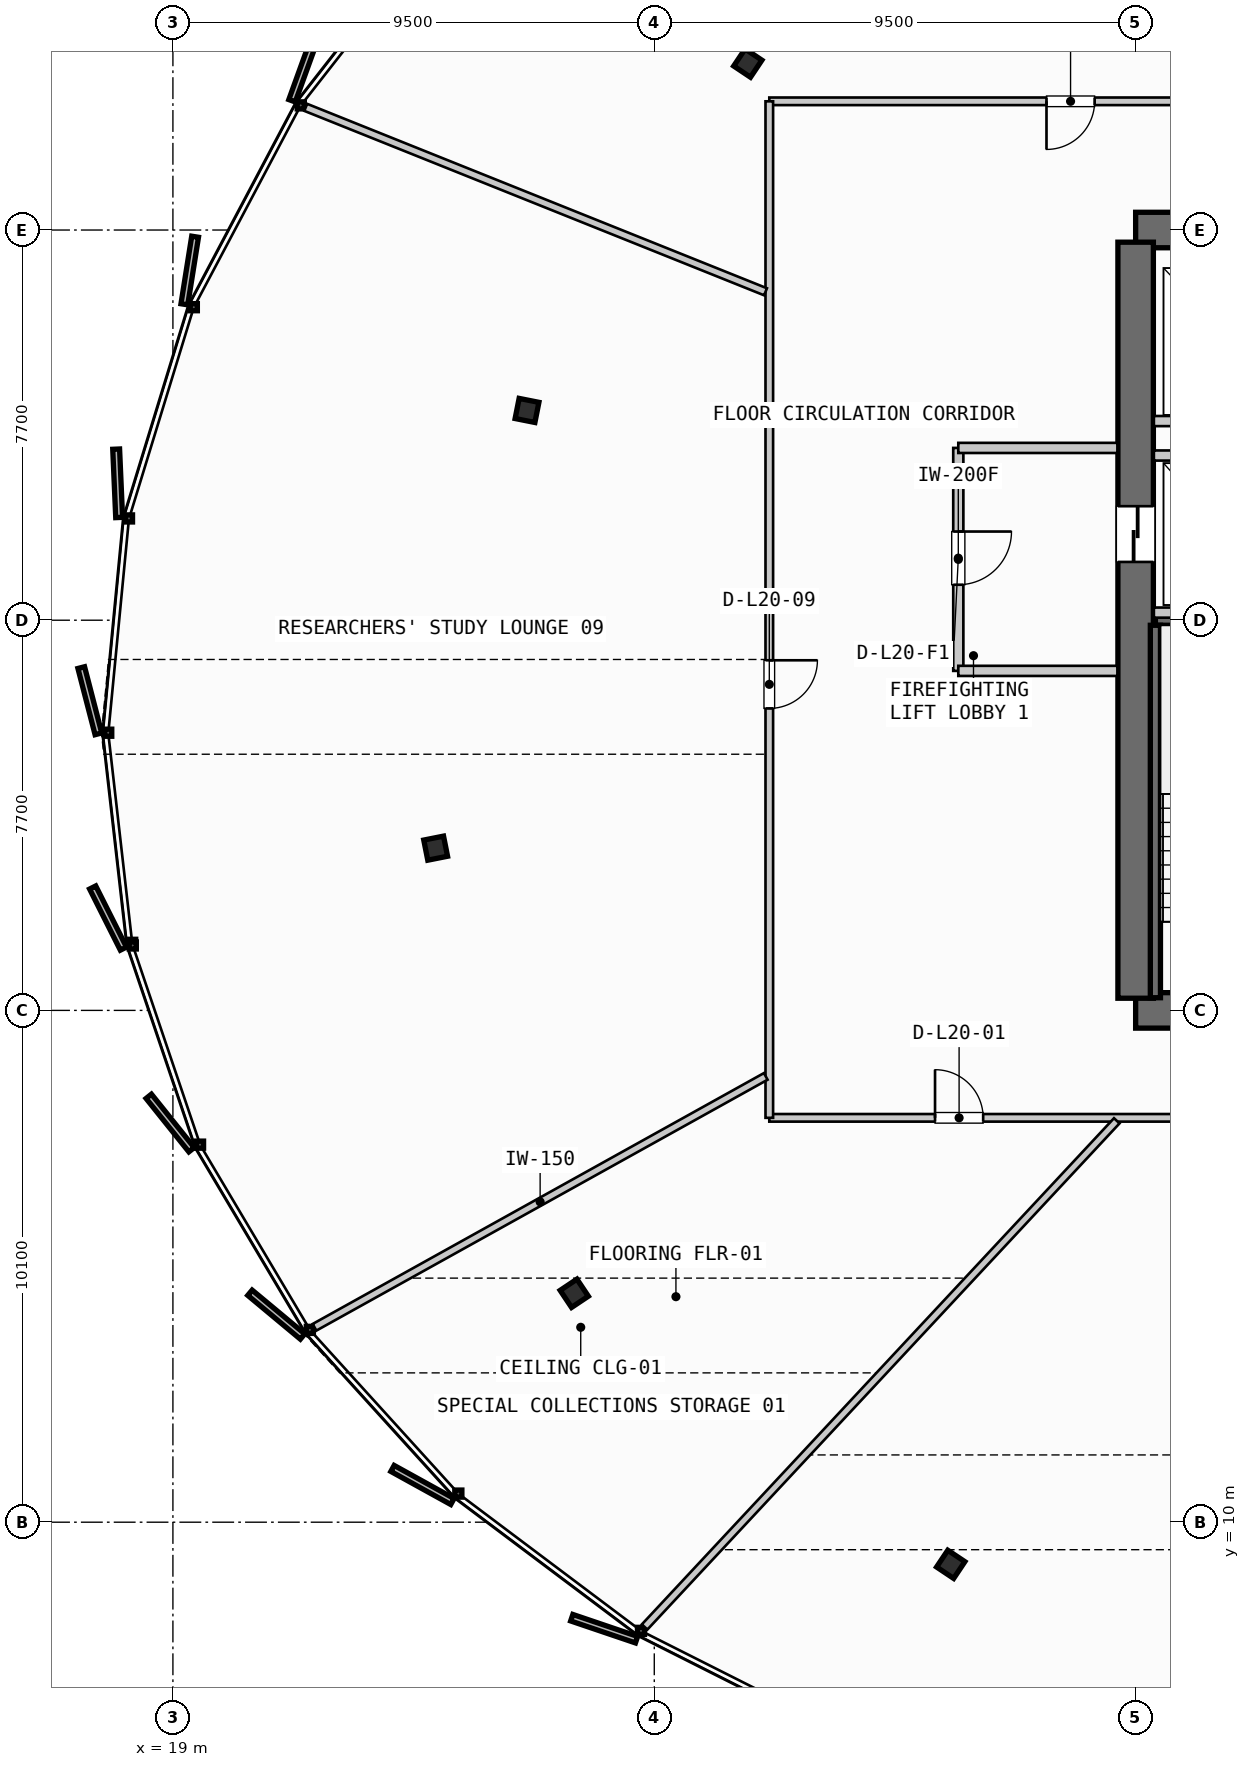
"""IFC4 building model, lengths in metres.
Left out: names, types, materials, properties, quantities, classifications, styles, units other than length and angle.
Written with IfcOpenShell. Run it as: python <this file> out.ifc"""

import sys

from ifc_helpers import new_model, si_unit, direction, frame, frame_2d, origin, origin_2d, place, context, subcontext, project, spatial, rectangle, i_section, extrude, source, transform, mapped, element, fill, save


model = new_model("IFC4")
c1 = context("Model", 3, precision=1e-05, world=origin(), true_north=direction((0.0, 1.0)))
c2 = subcontext(c1, "Body", "Model", "MODEL_VIEW")
j1 = project(units=[si_unit("LENGTHUNIT", "METRE"), si_unit("PLANEANGLEUNIT", "RADIAN")], contexts=[c1])
p1 = place(None, origin())
s1 = spatial("IfcSite", under=j1, at=p1, CompositionType="ELEMENT")
p2 = place(p1, origin())
s2 = spatial("IfcBuilding", under=s1, at=p2, CompositionType="ELEMENT")
p3 = place(p2, frame((0.0, 0.0, 85.6)))
s3 = spatial("IfcBuildingStorey", under=s2, at=p3, CompositionType="ELEMENT", Elevation=85.6)
p4 = place(p3, frame((38.0, 20.1, 0.0), z_axis=(0.0, 0.0, 1.0), x_axis=(1.0, 0.0, 0.0)))
e1 = element("IfcWall", 1, at=p4, inside=s3, PredefinedType="SHEAR", context=c2, shape_type="SweptSolid", body=[
    extrude(rectangle(XDim=17.6, YDim=0.7, at=frame_2d((8.8, 0.0))), origin(), (0.0, 0.0, 1.0), 3.35),
])
p5 = place(p4, frame((1.4, 0.0, 0.0)))
e2 = element("IfcOpeningElement", 2, at=p5, cuts=e1, PredefinedType="OPENING", context=c2, shape_type="SweptSolid", body=[
    extrude(rectangle(XDim=1.05, YDim=2.15, at=frame_2d((0.525, 1.075))), frame((0.0, 0.36, 0.0), z_axis=(0.0, -1.0, 0.0), x_axis=(1.0, 0.0, 0.0)), (0.0, 0.0, 1.0), 0.72),
])
p6 = place(p4, frame((15.15, 0.0, 0.0)))
e3 = element("IfcOpeningElement", 3, at=p6, cuts=e1, PredefinedType="OPENING", context=c2, shape_type="SweptSolid", body=[
    extrude(rectangle(XDim=1.05, YDim=2.15, at=frame_2d((0.525, 1.075))), frame((0.0, 0.36, 0.0), z_axis=(0.0, -1.0, 0.0), x_axis=(1.0, 0.0, 0.0)), (0.0, 0.0, 1.0), 0.72),
])
p7 = place(p3, frame((55.6, 35.5, 0.0), z_axis=(0.0, 0.0, 1.0), x_axis=(-1.0, 0.0, 0.0)))
e4 = element("IfcWall", 4, at=p7, inside=s3, PredefinedType="SHEAR", context=c2, shape_type="SweptSolid", body=[
    extrude(rectangle(XDim=17.6, YDim=0.7, at=frame_2d((8.8, 0.0))), origin(), (0.0, 0.0, 1.0), 3.35),
])
p8 = place(p7, frame((8.05, 0.0, 0.0)))
e5 = element("IfcOpeningElement", 5, at=p8, cuts=e4, PredefinedType="OPENING", context=c2, shape_type="SweptSolid", body=[
    extrude(rectangle(XDim=1.5, YDim=2.2, at=frame_2d((0.75, 1.1))), frame((0.0, 0.36, 0.0), z_axis=(0.0, -1.0, 0.0), x_axis=(1.0, 0.0, 0.0)), (0.0, 0.0, 1.0), 0.72),
])
p9 = place(p7, frame((14.95, 0.0, 0.0)))
e6 = element("IfcOpeningElement", 6, at=p9, cuts=e4, PredefinedType="OPENING", context=c2, shape_type="SweptSolid", body=[
    extrude(rectangle(XDim=1.4, YDim=2.3, at=frame_2d((0.7, 1.15))), frame((0.0, 0.36, 0.0), z_axis=(0.0, -1.0, 0.0), x_axis=(1.0, 0.0, 0.0)), (0.0, 0.0, 1.0), 0.72),
])
p10 = place(p7, frame((12.9, 0.0, 0.0)))
e7 = element("IfcOpeningElement", 7, at=p10, cuts=e4, PredefinedType="OPENING", context=c2, shape_type="SweptSolid", body=[
    extrude(rectangle(XDim=0.9, YDim=2.15, at=frame_2d((0.45, 1.075))), frame((0.0, 0.36, 0.0), z_axis=(0.0, -1.0, 0.0), x_axis=(1.0, 0.0, 0.0)), (0.0, 0.0, 1.0), 0.72),
])
p11 = place(p7, frame((10.6, 0.0, 0.0)))
e8 = element("IfcOpeningElement", 8, at=p11, cuts=e4, PredefinedType="OPENING", context=c2, shape_type="SweptSolid", body=[
    extrude(rectangle(XDim=0.95, YDim=2.15, at=frame_2d((0.475, 1.075))), frame((0.0, 0.36, 0.0), z_axis=(0.0, -1.0, 0.0), x_axis=(1.0, 0.0, 0.0)), (0.0, 0.0, 1.0), 0.72),
])
p12 = place(p3, frame((38.0, 35.26, 0.0), z_axis=(0.0, 0.0, 1.0), x_axis=(0.0, -1.0, 0.0)))
e9 = element("IfcWall", 9, at=p12, inside=s3, PredefinedType="SHEAR", context=c2, shape_type="SweptSolid", body=[
    extrude(rectangle(XDim=14.92, YDim=0.7, at=frame_2d((7.46, 0.0))), origin(), (0.0, 0.0, 1.0), 3.35),
])
p13 = place(p12, frame((5.21, 0.0, 0.0)))
e10 = element("IfcOpeningElement", 10, at=p13, cuts=e9, PredefinedType="OPENING", context=c2, shape_type="SweptSolid", body=[
    extrude(rectangle(XDim=1.1, YDim=2.2, at=frame_2d((0.55, 1.1))), frame((0.0, 0.36, 0.0), z_axis=(0.0, -1.0, 0.0), x_axis=(1.0, 0.0, 0.0)), (0.0, 0.0, 1.0), 0.72),
])
m1 = source(origin(), c2, "Body", "SweptSolid", [
    extrude(i_section(OverallWidth=0.405, OverallDepth=0.398, WebThickness=0.035, FlangeThickness=0.056, FilletRadius=0.015, at=origin_2d()), origin(), (0.0, 0.0, 1.0), 3.35),
])
for number, where, z_axis, x_axis in (
    (11, (30.346, 38.794, 0.0), (0.0, 0.0, 1.0), (-0.831, 0.556, 0.0)),
    (12, (25.989, 31.94, 0.0), (0.0, 0.0, 1.0), (-0.981, 0.195, 0.0)),
    (13, (24.185, 23.302, 0.0), (0.0, 0.0, 1.0), (-0.981, -0.195, 0.0)),
    (14, (26.921, 14.517, 0.0), (0.0, 0.0, 1.0), (-0.831, -0.556, 0.0)),
    (15, (34.351, 9.168, 0.0), (0.0, 0.0, 1.0), (-0.556, -0.831, 0.0)),
):
    element("IfcColumn", number, at=place(p3, frame(where, z_axis=z_axis, x_axis=x_axis)), inside=s3, PredefinedType="COLUMN", context=c2, shape_type="MappedRepresentation", body=[
        mapped(m1, transform((0.0, 0.0, 0.0), scale=1.0)),
    ])
p14 = place(p3, frame((38.39, 27.8, 0.0), z_axis=(0.0, 0.0, 1.0), x_axis=(1.0, 0.0, 0.0)))
e16 = element("IfcWall", 16, at=p14, inside=s3, PredefinedType="SHEAR", context=c2, shape_type="SweptSolid", body=[
    extrude(rectangle(XDim=3.06, YDim=0.2, at=frame_2d((1.53, 0.0))), origin(), (0.0, 0.0, 1.0), 3.35),
])
p15 = place(p3, frame((38.39, 20.35, 0.0), z_axis=(0.0, 0.0, 1.0), x_axis=(0.0, 1.0, 0.0)))
e17 = element("IfcWall", 17, at=p15, inside=s3, PredefinedType="SHEAR", context=c2, shape_type="SweptSolid", body=[
    extrude(rectangle(XDim=7.35, YDim=0.2, at=frame_2d((3.675, 0.0))), origin(), (0.0, 0.0, 1.0), 3.35),
])
for number, where, z_axis, x_axis in (
    (18, (38.36, 27.95, 0.0), (0.0, 0.0, 1.0), (1.0, 0.0, 0.0)),
    (19, (38.36, 31.05, 0.0), (0.0, 0.0, 1.0), (1.0, 0.0, 0.0)),
):
    element("IfcWall", number, at=place(p3, frame(where, z_axis=z_axis, x_axis=x_axis)), inside=s3, PredefinedType="PARTITIONING", context=c2, shape_type="SweptSolid", body=[
        extrude(rectangle(XDim=2.79, YDim=0.2, at=frame_2d((1.395, 0.0))), origin(), (0.0, 0.0, 1.0), 2.28),
    ])
p16 = place(p3, frame((34.5, 31.2, 0.0), z_axis=(0.0, 0.0, 1.0), x_axis=(0.0, -1.0, 0.0)))
e20 = element("IfcWall", 20, at=p16, inside=s3, PredefinedType="PARTITIONING", context=c2, shape_type="SweptSolid", body=[
    extrude(rectangle(XDim=4.4, YDim=0.2, at=frame_2d((2.2, 0.0))), origin(), (0.0, 0.0, 1.0), 2.28),
])
p17 = place(p16, frame((1.65, 0.0, 0.0)))
e21 = element("IfcOpeningElement", 21, at=p17, cuts=e20, PredefinedType="OPENING", context=c2, shape_type="SweptSolid", body=[
    extrude(rectangle(XDim=1.05, YDim=2.15, at=frame_2d((0.525, 1.075))), frame((0.0, 0.11, 0.0), z_axis=(0.0, -1.0, 0.0), x_axis=(1.0, 0.0, 0.0)), (0.0, 0.0, 1.0), 0.22),
])
for number, where, z_axis, x_axis in (
    (22, (34.5, 26.8, 0.0), (0.0, 0.0, 1.0), (1.0, 0.0, 0.0)),
    (23, (34.5, 31.2, 0.0), (0.0, 0.0, 1.0), (1.0, 0.0, 0.0)),
):
    element("IfcWall", number, at=place(p3, frame(where, z_axis=z_axis, x_axis=x_axis)), inside=s3, PredefinedType="PARTITIONING", context=c2, shape_type="SweptSolid", body=[
        extrude(rectangle(XDim=3.14, YDim=0.2, at=frame_2d((1.57, 0.0))), origin(), (0.0, 0.0, 1.0), 2.28),
    ])
p18 = place(p3, frame((38.36, 31.73, 0.0), z_axis=(0.0, 0.0, 1.0), x_axis=(1.0, 0.0, 0.0)))
e24 = element("IfcWall", 24, at=p18, inside=s3, PredefinedType="PARTITIONING", context=c2, shape_type="SweptSolid", body=[
    extrude(rectangle(XDim=7.44, YDim=0.2, at=frame_2d((3.72, 0.0))), origin(), (0.0, 0.0, 1.0), 2.28),
])
p19 = place(p3, frame((30.77, 17.98, 0.0), z_axis=(0.0, 0.0, 1.0), x_axis=(1.0, 0.0, 0.0)))
e25 = element("IfcWall", 25, at=p19, inside=s3, PredefinedType="PARTITIONING", context=c2, shape_type="SweptSolid", body=[
    extrude(rectangle(XDim=31.54, YDim=0.15, at=frame_2d((15.77, 0.0))), origin(), (0.0, 0.0, 1.0), 2.28),
])
p20 = place(p19, frame((3.271, 0.0, 0.0)))
e26 = element("IfcOpeningElement", 26, at=p20, cuts=e25, PredefinedType="OPENING", context=c2, shape_type="SweptSolid", body=[
    extrude(rectangle(XDim=0.95, YDim=2.15, at=frame_2d((0.475, 1.075))), frame((0.0, 0.085, 0.0), z_axis=(0.0, -1.0, 0.0), x_axis=(1.0, 0.0, 0.0)), (0.0, 0.0, 1.0), 0.17),
])
p21 = place(p19, frame((13.234, 0.0, 0.0)))
e27 = element("IfcOpeningElement", 27, at=p21, cuts=e25, PredefinedType="OPENING", context=c2, shape_type="SweptSolid", body=[
    extrude(rectangle(XDim=0.95, YDim=2.15, at=frame_2d((0.475, 1.075))), frame((0.0, 0.085, 0.0), z_axis=(0.0, -1.0, 0.0), x_axis=(1.0, 0.0, 0.0)), (0.0, 0.0, 1.0), 0.17),
])
p22 = place(p19, frame((25.295, 0.0, 0.0)))
e28 = element("IfcOpeningElement", 28, at=p22, cuts=e25, PredefinedType="OPENING", context=c2, shape_type="SweptSolid", body=[
    extrude(rectangle(XDim=0.95, YDim=2.15, at=frame_2d((0.475, 1.075))), frame((0.0, 0.085, 0.0), z_axis=(0.0, -1.0, 0.0), x_axis=(1.0, 0.0, 0.0)), (0.0, 0.0, 1.0), 0.17),
])
p23 = place(p3, frame((62.31, 38.04, 0.0), z_axis=(0.0, 0.0, 1.0), x_axis=(-1.0, 0.0, 0.0)))
e29 = element("IfcWall", 29, at=p23, inside=s3, PredefinedType="PARTITIONING", context=c2, shape_type="SweptSolid", body=[
    extrude(rectangle(XDim=31.54, YDim=0.15, at=frame_2d((15.77, 0.0))), origin(), (0.0, 0.0, 1.0), 2.28),
])
p24 = place(p23, frame((2.419, 0.0, 0.0)))
e30 = element("IfcOpeningElement", 30, at=p24, cuts=e29, PredefinedType="OPENING", context=c2, shape_type="SweptSolid", body=[
    extrude(rectangle(XDim=0.95, YDim=2.15, at=frame_2d((0.475, 1.075))), frame((0.0, 0.085, 0.0), z_axis=(0.0, -1.0, 0.0), x_axis=(1.0, 0.0, 0.0)), (0.0, 0.0, 1.0), 0.17),
])
p25 = place(p23, frame((12.199, 0.0, 0.0)))
e31 = element("IfcOpeningElement", 31, at=p25, cuts=e29, PredefinedType="OPENING", context=c2, shape_type="SweptSolid", body=[
    extrude(rectangle(XDim=0.95, YDim=2.15, at=frame_2d((0.475, 1.075))), frame((0.0, 0.085, 0.0), z_axis=(0.0, -1.0, 0.0), x_axis=(1.0, 0.0, 0.0)), (0.0, 0.0, 1.0), 0.17),
])
p26 = place(p23, frame((25.119, 0.0, 0.0)))
e32 = element("IfcOpeningElement", 32, at=p26, cuts=e29, PredefinedType="OPENING", context=c2, shape_type="SweptSolid", body=[
    extrude(rectangle(XDim=0.95, YDim=2.15, at=frame_2d((0.475, 1.075))), frame((0.0, 0.085, 0.0), z_axis=(0.0, -1.0, 0.0), x_axis=(1.0, 0.0, 0.0)), (0.0, 0.0, 1.0), 0.17),
])
p27 = place(p3, frame((30.77, 38.04, 0.0), z_axis=(0.0, 0.0, 1.0), x_axis=(0.0, -1.0, 0.0)))
e33 = element("IfcWall", 33, at=p27, inside=s3, PredefinedType="PARTITIONING", context=c2, shape_type="SweptSolid", body=[
    extrude(rectangle(XDim=20.06, YDim=0.15, at=frame_2d((10.03, 0.0))), origin(), (0.0, 0.0, 1.0), 2.28),
])
p28 = place(p27, frame((11.031, 0.0, 0.0)))
e34 = element("IfcOpeningElement", 34, at=p28, cuts=e33, PredefinedType="OPENING", context=c2, shape_type="SweptSolid", body=[
    extrude(rectangle(XDim=0.95, YDim=2.15, at=frame_2d((0.475, 1.075))), frame((0.0, 0.085, 0.0), z_axis=(0.0, -1.0, 0.0), x_axis=(1.0, 0.0, 0.0)), (0.0, 0.0, 1.0), 0.17),
])
p29 = place(p3, frame((30.7, 18.797, 0.0), z_axis=(0.0, 0.0, 1.0), x_axis=(-0.874030662719, -0.485870765355, 0.0)))
e35 = element("IfcWall", 35, at=p29, inside=s3, PredefinedType="PARTITIONING", context=c2, shape_type="SweptSolid", body=[
    extrude(rectangle(XDim=10.189, YDim=0.15, at=frame_2d((5.095, 0.0))), origin(), (0.0, 0.0, 1.0), 2.28),
])
p30 = place(p3, frame((37.627, 17.921, 0.0), z_axis=(0.0, 0.0, 1.0), x_axis=(-0.682114454088, -0.73124542496, 0.0)))
e36 = element("IfcWall", 36, at=p30, inside=s3, PredefinedType="PARTITIONING", context=c2, shape_type="SweptSolid", body=[
    extrude(rectangle(XDim=13.66, YDim=0.15, at=frame_2d((6.83, 0.0))), origin(), (0.0, 0.0, 1.0), 2.28),
])
p31 = place(p3, frame((42.048, 38.113, 0.0), z_axis=(0.0, 0.0, 1.0), x_axis=(-0.418444712676, 0.908242270781, 0.0)))
e37 = element("IfcWall", 37, at=p31, inside=s3, PredefinedType="PARTITIONING", context=c2, shape_type="SweptSolid", body=[
    extrude(rectangle(XDim=12.721, YDim=0.15, at=frame_2d((6.361, 0.0))), origin(), (0.0, 0.0, 1.0), 2.28),
])
p32 = place(p3, frame((30.696, 34.281, 0.0), z_axis=(0.0, 0.0, 1.0), x_axis=(-0.92813187897, 0.372251548337, 0.0)))
e38 = element("IfcWall", 38, at=p32, inside=s3, PredefinedType="PARTITIONING", context=c2, shape_type="SweptSolid", body=[
    extrude(rectangle(XDim=9.777, YDim=0.15, at=frame_2d((4.889, 0.0))), origin(), (0.0, 0.0, 1.0), 2.28),
])
m2 = source(origin(), c2, "Body", "SweptSolid", [
    extrude(rectangle(XDim=1.1, YDim=2.2, at=frame_2d((0.55, 1.1))), frame((0.0, 0.025, 0.0), z_axis=(0.0, -1.0, 0.0), x_axis=(1.0, 0.0, 0.0)), (0.0, 0.0, 1.0), 0.05),
])
p33 = place(p13, origin())
e39 = element("IfcDoor", 39, at=p33, inside=s3, OperationType="SLIDING_TO_LEFT", PredefinedType="DOOR", context=c2, shape_type="MappedRepresentation", body=[
    mapped(m2, transform((0.0, 0.0, 0.0), scale=1.0)),
])
fill(e10, e39)
m3 = source(origin(), c2, "Body", "SweptSolid", [
    extrude(rectangle(XDim=1.05, YDim=2.15, at=frame_2d((0.525, 1.075))), frame((0.0, 0.025, 0.0), z_axis=(0.0, -1.0, 0.0), x_axis=(1.0, 0.0, 0.0)), (0.0, 0.0, 1.0), 0.05),
])
p34 = place(p17, origin())
e40 = element("IfcDoor", 40, at=p34, inside=s3, OperationType="SINGLE_SWING_LEFT", PredefinedType="DOOR", context=c2, shape_type="MappedRepresentation", body=[
    mapped(m3, transform((0.0, 0.0, 0.0), scale=1.0)),
])
fill(e21, e40)
m4 = source(origin(), c2, "Body", "SweptSolid", [
    extrude(rectangle(XDim=0.95, YDim=2.15, at=frame_2d((0.475, 1.075))), frame((0.0, 0.025, 0.0), z_axis=(0.0, -1.0, 0.0), x_axis=(1.0, 0.0, 0.0)), (0.0, 0.0, 1.0), 0.05),
])
p35 = place(p20, origin())
e41 = element("IfcDoor", 41, at=p35, inside=s3, OperationType="SINGLE_SWING_LEFT", PredefinedType="DOOR", context=c2, shape_type="MappedRepresentation", body=[
    mapped(m4, transform((0.0, 0.0, 0.0), scale=1.0)),
])
fill(e26, e41)
p36 = place(p26, origin())
e42 = element("IfcDoor", 42, at=p36, inside=s3, OperationType="SINGLE_SWING_RIGHT", PredefinedType="DOOR", context=c2, shape_type="MappedRepresentation", body=[
    mapped(m4, transform((0.0, 0.0, 0.0), scale=1.0)),
])
fill(e32, e42)
p37 = place(p28, origin())
e43 = element("IfcDoor", 43, at=p37, inside=s3, OperationType="SINGLE_SWING_LEFT", PredefinedType="DOOR", context=c2, shape_type="MappedRepresentation", body=[
    mapped(m4, transform((0.0, 0.0, 0.0), scale=1.0)),
])
fill(e34, e43)
save(model, sys.argv[1])
